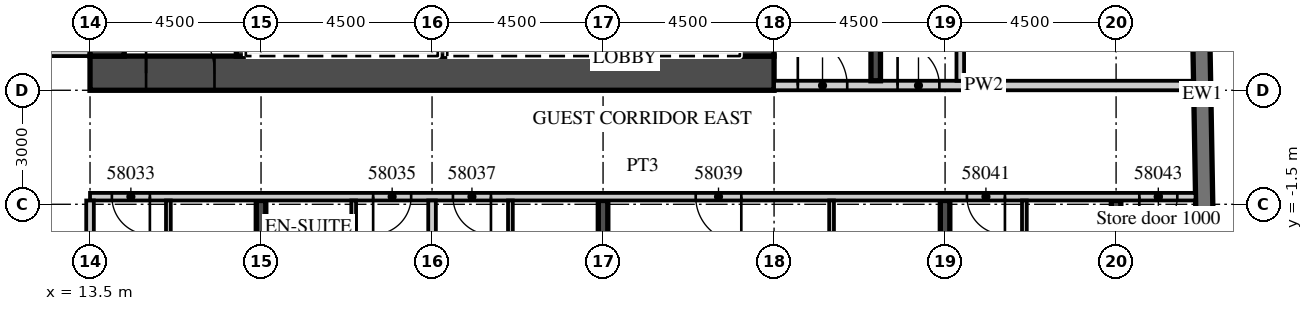
"""IFC4 building model, lengths in metres.
Left out: names, types, materials, properties, quantities, classifications, styles, units other than length and angle.
Written with IfcOpenShell. Run it as: python <this file> out.ifc"""

import sys

from ifc_helpers import new_model, si_unit, direction, frame, frame_2d, origin, place, context, subcontext, project, spatial, rectangle, extrude, element, fill, save


model = new_model("IFC4")
c1 = context("Model", 3, precision=1e-05, world=origin(), true_north=direction((0.0, 1.0)))
c2 = subcontext(c1, "Body", "Model", "MODEL_VIEW")
j1 = project(units=[si_unit("LENGTHUNIT", "METRE"), si_unit("PLANEANGLEUNIT", "RADIAN")], contexts=[c1])
p1 = place(None, origin())
s1 = spatial("IfcSite", under=j1, at=p1, CompositionType="ELEMENT")
p2 = place(p1, origin())
s2 = spatial("IfcBuilding", under=s1, at=p2, CompositionType="ELEMENT")
p3 = place(p2, frame((0.0, 0.0, 237.5)))
s3 = spatial("IfcBuildingStorey", under=s2, at=p3, CompositionType="ELEMENT", Elevation=237.5)
p4 = place(p3, frame((18.0, -19.079, 0.0), z_axis=(0.0, 0.0, 1.0), x_axis=(0.0, 1.0, 0.0)))
e1 = element("IfcWall", 1, at=p4, inside=s3, PredefinedType="SHEAR", context=c2, shape_type="SweptSolid", body=[
    extrude(rectangle(XDim=17.679, YDim=0.25, at=frame_2d((8.84, 0.0))), origin(), (0.0, 0.0, 1.0), 3.3),
])
p5 = place(p3, frame((27.0, -18.922, 0.0), z_axis=(0.0, 0.0, 1.0), x_axis=(0.0, 1.0, 0.0)))
e2 = element("IfcWall", 2, at=p5, inside=s3, PredefinedType="SHEAR", context=c2, shape_type="SweptSolid", body=[
    extrude(rectangle(XDim=17.522, YDim=0.25, at=frame_2d((8.761, 0.0))), origin(), (0.0, 0.0, 1.0), 3.3),
])
p6 = place(p3, frame((36.0, -18.765, 0.0), z_axis=(0.0, 0.0, 1.0), x_axis=(0.0, 1.0, 0.0)))
e3 = element("IfcWall", 3, at=p6, inside=s3, PredefinedType="SHEAR", context=c2, shape_type="SweptSolid", body=[
    extrude(rectangle(XDim=17.365, YDim=0.25, at=frame_2d((8.683, 0.0))), origin(), (0.0, 0.0, 1.0), 3.3),
])
p7 = place(p3, frame((40.5, -18.325, 0.0), z_axis=(0.0, 0.0, 1.0), x_axis=(0.0, 1.0, 0.0)))
e4 = element("IfcWall", 4, at=p7, inside=s3, PredefinedType="SHEAR", context=c2, shape_type="SweptSolid", body=[
    extrude(rectangle(XDim=16.925, YDim=0.25, at=frame_2d((8.463, 0.0))), origin(), (0.0, 0.0, 1.0), 3.3),
])
p8 = place(p3, frame((43.057, -15.103, 0.0), z_axis=(0.0, 0.0, 1.0), x_axis=(-0.017452408953, 0.999847695112, 0.0)))
e5 = element("IfcWall", 5, at=p8, inside=s3, PredefinedType="SOLIDWALL", context=c2, shape_type="SweptSolid", body=[
    extrude(rectangle(XDim=33.0, YDim=0.45, at=frame_2d((16.5, 0.0))), origin(), (0.0, 0.0, 1.0), 3.02),
])
p9 = place(p3, frame((-13.5, 2.5, 0.0), z_axis=(0.0, 0.0, 1.0), x_axis=(1.0, 0.0, 0.0)))
e6 = element("IfcWall", 6, at=p9, inside=s3, PredefinedType="PARTITIONING", context=c2, shape_type="SweptSolid", body=[
    extrude(rectangle(XDim=27.0, YDim=0.2, at=frame_2d((13.5, 0.0))), origin(), (0.0, 0.0, 1.0), 3.02),
])
p10 = place(p9, frame((2.925, 0.0, 0.0)))
e7 = element("IfcOpeningElement", 7, at=p10, cuts=e6, PredefinedType="OPENING", context=c2, shape_type="SweptSolid", body=[
    extrude(rectangle(XDim=1.0, YDim=2.1, at=frame_2d((0.5, 1.05))), frame((0.0, 0.11, 0.0), z_axis=(0.0, -1.0, 0.0), x_axis=(1.0, 0.0, 0.0)), (0.0, 0.0, 1.0), 0.22),
])
p11 = place(p9, frame((7.45, 0.0, 0.0)))
e8 = element("IfcOpeningElement", 8, at=p11, cuts=e6, PredefinedType="OPENING", context=c2, shape_type="SweptSolid", body=[
    extrude(rectangle(XDim=1.0, YDim=2.1, at=frame_2d((0.5, 1.05))), frame((0.0, 0.11, 0.0), z_axis=(0.0, -1.0, 0.0), x_axis=(1.0, 0.0, 0.0)), (0.0, 0.0, 1.0), 0.22),
])
p12 = place(p9, frame((11.925, 0.0, 0.0)))
e9 = element("IfcOpeningElement", 9, at=p12, cuts=e6, PredefinedType="OPENING", context=c2, shape_type="SweptSolid", body=[
    extrude(rectangle(XDim=1.0, YDim=2.1, at=frame_2d((0.5, 1.05))), frame((0.0, 0.11, 0.0), z_axis=(0.0, -1.0, 0.0), x_axis=(1.0, 0.0, 0.0)), (0.0, 0.0, 1.0), 0.22),
])
p13 = place(p9, frame((16.45, 0.0, 0.0)))
e10 = element("IfcOpeningElement", 10, at=p13, cuts=e6, PredefinedType="OPENING", context=c2, shape_type="SweptSolid", body=[
    extrude(rectangle(XDim=1.0, YDim=2.1, at=frame_2d((0.5, 1.05))), frame((0.0, 0.11, 0.0), z_axis=(0.0, -1.0, 0.0), x_axis=(1.0, 0.0, 0.0)), (0.0, 0.0, 1.0), 0.22),
])
p14 = place(p9, frame((18.55, 0.0, 0.0)))
e11 = element("IfcOpeningElement", 11, at=p14, cuts=e6, PredefinedType="OPENING", context=c2, shape_type="SweptSolid", body=[
    extrude(rectangle(XDim=1.0, YDim=2.1, at=frame_2d((0.5, 1.05))), frame((0.0, 0.11, 0.0), z_axis=(0.0, -1.0, 0.0), x_axis=(1.0, 0.0, 0.0)), (0.0, 0.0, 1.0), 0.22),
])
p15 = place(p9, frame((23.075, 0.0, 0.0)))
e12 = element("IfcOpeningElement", 12, at=p15, cuts=e6, PredefinedType="OPENING", context=c2, shape_type="SweptSolid", body=[
    extrude(rectangle(XDim=1.0, YDim=2.1, at=frame_2d((0.5, 1.05))), frame((0.0, 0.11, 0.0), z_axis=(0.0, -1.0, 0.0), x_axis=(1.0, 0.0, 0.0)), (0.0, 0.0, 1.0), 0.22),
])
p16 = place(p3, frame((13.5, -1.3, 0.0), z_axis=(0.0, 0.0, 1.0), x_axis=(1.0, 0.0, 0.0)))
e13 = element("IfcWall", 13, at=p16, inside=s3, PredefinedType="PARTITIONING", context=c2, shape_type="SweptSolid", body=[
    extrude(rectangle(XDim=29.091, YDim=0.2, at=frame_2d((14.545, 0.0))), origin(), (0.0, 0.0, 1.0), 3.02),
])
p17 = place(p16, frame((0.575, 0.0, 0.0)))
e14 = element("IfcOpeningElement", 14, at=p17, cuts=e13, PredefinedType="OPENING", context=c2, shape_type="SweptSolid", body=[
    extrude(rectangle(XDim=1.0, YDim=2.1, at=frame_2d((0.5, 1.05))), frame((0.0, 0.11, 0.0), z_axis=(0.0, -1.0, 0.0), x_axis=(1.0, 0.0, 0.0)), (0.0, 0.0, 1.0), 0.22),
])
p18 = place(p16, frame((7.45, 0.0, 0.0)))
e15 = element("IfcOpeningElement", 15, at=p18, cuts=e13, PredefinedType="OPENING", context=c2, shape_type="SweptSolid", body=[
    extrude(rectangle(XDim=1.0, YDim=2.1, at=frame_2d((0.5, 1.05))), frame((0.0, 0.11, 0.0), z_axis=(0.0, -1.0, 0.0), x_axis=(1.0, 0.0, 0.0)), (0.0, 0.0, 1.0), 0.22),
])
p19 = place(p16, frame((9.55, 0.0, 0.0)))
e16 = element("IfcOpeningElement", 16, at=p19, cuts=e13, PredefinedType="OPENING", context=c2, shape_type="SweptSolid", body=[
    extrude(rectangle(XDim=1.0, YDim=2.1, at=frame_2d((0.5, 1.05))), frame((0.0, 0.11, 0.0), z_axis=(0.0, -1.0, 0.0), x_axis=(1.0, 0.0, 0.0)), (0.0, 0.0, 1.0), 0.22),
])
p20 = place(p16, frame((15.938, 0.0, 0.0)))
e17 = element("IfcOpeningElement", 17, at=p20, cuts=e13, PredefinedType="OPENING", context=c2, shape_type="SweptSolid", body=[
    extrude(rectangle(XDim=1.2, YDim=2.1, at=frame_2d((0.6, 1.05))), frame((0.0, 0.11, 0.0), z_axis=(0.0, -1.0, 0.0), x_axis=(1.0, 0.0, 0.0)), (0.0, 0.0, 1.0), 0.22),
])
p21 = place(p16, frame((23.075, 0.0, 0.0)))
e18 = element("IfcOpeningElement", 18, at=p21, cuts=e13, PredefinedType="OPENING", context=c2, shape_type="SweptSolid", body=[
    extrude(rectangle(XDim=1.0, YDim=2.1, at=frame_2d((0.5, 1.05))), frame((0.0, 0.11, 0.0), z_axis=(0.0, -1.0, 0.0), x_axis=(1.0, 0.0, 0.0)), (0.0, 0.0, 1.0), 0.22),
])
p22 = place(p16, frame((27.611, 0.0, 0.0)))
e19 = element("IfcOpeningElement", 19, at=p22, cuts=e13, PredefinedType="OPENING", context=c2, shape_type="SweptSolid", body=[
    extrude(rectangle(XDim=1.0, YDim=2.4, at=frame_2d((0.5, 1.2))), frame((0.0, 0.11, 0.0), z_axis=(0.0, -1.0, 0.0), x_axis=(1.0, 0.0, 0.0)), (0.0, 0.0, 1.0), 0.22),
])
p23 = place(p3, frame((13.5, -19.17, 0.0), z_axis=(0.0, 0.0, 1.0), x_axis=(0.0, 1.0, 0.0)))
e20 = element("IfcWall", 20, at=p23, inside=s3, PredefinedType="PARTITIONING", context=c2, shape_type="SweptSolid", body=[
    extrude(rectangle(XDim=17.77, YDim=0.2, at=frame_2d((8.885, 0.0))), origin(), (0.0, 0.0, 1.0), 3.02),
])
p24 = place(p3, frame((15.562, -5.125, 0.0), z_axis=(0.0, 0.0, 1.0), x_axis=(0.0, 1.0, 0.0)))
e21 = element("IfcWall", 21, at=p24, inside=s3, PredefinedType="PARTITIONING", context=c2, shape_type="SweptSolid", body=[
    extrude(rectangle(XDim=3.725, YDim=0.125, at=frame_2d((1.863, 0.0))), origin(), (0.0, 0.0, 1.0), 3.02),
])
p25 = place(p24, frame((0.375, 0.0, 0.0)))
e22 = element("IfcOpeningElement", 22, at=p25, cuts=e21, PredefinedType="OPENING", context=c2, shape_type="SweptSolid", body=[
    extrude(rectangle(XDim=0.9, YDim=2.1, at=frame_2d((0.45, 1.05))), frame((0.0, 0.073, 0.0), z_axis=(0.0, -1.0, 0.0), x_axis=(1.0, 0.0, 0.0)), (0.0, 0.0, 1.0), 0.145),
])
p26 = place(p3, frame((22.5, -19.013, 0.0), z_axis=(0.0, 0.0, 1.0), x_axis=(0.0, 1.0, 0.0)))
e23 = element("IfcWall", 23, at=p26, inside=s3, PredefinedType="PARTITIONING", context=c2, shape_type="SweptSolid", body=[
    extrude(rectangle(XDim=17.613, YDim=0.2, at=frame_2d((8.807, 0.0))), origin(), (0.0, 0.0, 1.0), 3.02),
])
p27 = place(p3, frame((20.438, -5.125, 0.0), z_axis=(0.0, 0.0, 1.0), x_axis=(0.0, 1.0, 0.0)))
e24 = element("IfcWall", 24, at=p27, inside=s3, PredefinedType="PARTITIONING", context=c2, shape_type="SweptSolid", body=[
    extrude(rectangle(XDim=3.725, YDim=0.125, at=frame_2d((1.863, 0.0))), origin(), (0.0, 0.0, 1.0), 3.02),
])
p28 = place(p27, frame((0.375, 0.0, 0.0)))
e25 = element("IfcOpeningElement", 25, at=p28, cuts=e24, PredefinedType="OPENING", context=c2, shape_type="SweptSolid", body=[
    extrude(rectangle(XDim=0.9, YDim=2.1, at=frame_2d((0.45, 1.05))), frame((0.0, 0.073, 0.0), z_axis=(0.0, -1.0, 0.0), x_axis=(1.0, 0.0, 0.0)), (0.0, 0.0, 1.0), 0.145),
])
p29 = place(p3, frame((24.562, -5.125, 0.0), z_axis=(0.0, 0.0, 1.0), x_axis=(0.0, 1.0, 0.0)))
e26 = element("IfcWall", 26, at=p29, inside=s3, PredefinedType="PARTITIONING", context=c2, shape_type="SweptSolid", body=[
    extrude(rectangle(XDim=3.725, YDim=0.125, at=frame_2d((1.863, 0.0))), origin(), (0.0, 0.0, 1.0), 3.02),
])
p30 = place(p29, frame((0.375, 0.0, 0.0)))
e27 = element("IfcOpeningElement", 27, at=p30, cuts=e26, PredefinedType="OPENING", context=c2, shape_type="SweptSolid", body=[
    extrude(rectangle(XDim=0.9, YDim=2.1, at=frame_2d((0.45, 1.05))), frame((0.0, 0.073, 0.0), z_axis=(0.0, -1.0, 0.0), x_axis=(1.0, 0.0, 0.0)), (0.0, 0.0, 1.0), 0.145),
])
p31 = place(p3, frame((33.013, -5.125, 0.0), z_axis=(0.0, 0.0, 1.0), x_axis=(0.0, 1.0, 0.0)))
e28 = element("IfcWall", 28, at=p31, inside=s3, PredefinedType="PARTITIONING", context=c2, shape_type="SweptSolid", body=[
    extrude(rectangle(XDim=3.725, YDim=0.125, at=frame_2d((1.863, 0.0))), origin(), (0.0, 0.0, 1.0), 3.02),
])
p32 = place(p31, frame((0.375, 0.0, 0.0)))
e29 = element("IfcOpeningElement", 29, at=p32, cuts=e28, PredefinedType="OPENING", context=c2, shape_type="SweptSolid", body=[
    extrude(rectangle(XDim=0.9, YDim=2.1, at=frame_2d((0.45, 1.05))), frame((0.0, 0.073, 0.0), z_axis=(0.0, -1.0, 0.0), x_axis=(1.0, 0.0, 0.0)), (0.0, 0.0, 1.0), 0.145),
])
p33 = place(p3, frame((38.087, -5.125, 0.0), z_axis=(0.0, 0.0, 1.0), x_axis=(0.0, 1.0, 0.0)))
e30 = element("IfcWall", 30, at=p33, inside=s3, PredefinedType="PARTITIONING", context=c2, shape_type="SweptSolid", body=[
    extrude(rectangle(XDim=3.725, YDim=0.125, at=frame_2d((1.863, 0.0))), origin(), (0.0, 0.0, 1.0), 3.02),
])
p34 = place(p33, frame((0.375, 0.0, 0.0)))
e31 = element("IfcOpeningElement", 31, at=p34, cuts=e30, PredefinedType="OPENING", context=c2, shape_type="SweptSolid", body=[
    extrude(rectangle(XDim=0.9, YDim=2.1, at=frame_2d((0.45, 1.05))), frame((0.0, 0.073, 0.0), z_axis=(0.0, -1.0, 0.0), x_axis=(1.0, 0.0, 0.0)), (0.0, 0.0, 1.0), 0.145),
])
p35 = place(p3, frame((13.5, 1.95, 0.0), z_axis=(0.0, 0.0, 1.0), x_axis=(1.0, 0.0, 0.0)))
e32 = element("IfcWall", 32, at=p35, inside=s3, PredefinedType="SHEAR", context=c2, shape_type="SweptSolid", body=[
    extrude(rectangle(XDim=18.0, YDim=0.9, at=frame_2d((9.0, 0.0))), origin(), (0.0, 0.0, 1.0), 3.02),
])
p36 = place(p35, frame((1.475, 0.0, 0.0)))
e33 = element("IfcOpeningElement", 33, at=p36, cuts=e32, PredefinedType="OPENING", context=c2, shape_type="SweptSolid", body=[
    extrude(rectangle(XDim=1.8, YDim=2.1, at=frame_2d((0.9, 1.05))), frame((0.0, 0.46, 0.0), z_axis=(0.0, -1.0, 0.0), x_axis=(1.0, 0.0, 0.0)), (0.0, 0.0, 1.0), 0.92),
])
p37 = place(p3, frame((31.05, 2.4, 0.0), z_axis=(0.0, 0.0, 1.0), x_axis=(0.0, 1.0, 0.0)))
e34 = element("IfcWall", 34, at=p37, inside=s3, PredefinedType="SHEAR", context=c2, shape_type="SweptSolid", body=[
    extrude(rectangle(XDim=12.8, YDim=0.9, at=frame_2d((6.4, 0.0))), origin(), (0.0, 0.0, 1.0), 3.02),
])
p38 = place(p37, frame((0.2, 0.0, 0.0)))
e35 = element("IfcOpeningElement", 35, at=p38, cuts=e34, PredefinedType="OPENING", context=c2, shape_type="SweptSolid", body=[
    extrude(rectangle(XDim=1.1, YDim=2.1, at=frame_2d((0.55, 1.05))), frame((0.0, 0.46, 0.0), z_axis=(0.0, -1.0, 0.0), x_axis=(1.0, 0.0, 0.0)), (0.0, 0.0, 1.0), 0.92),
])
p39 = place(p3, frame((13.95, 2.4, 0.0), z_axis=(0.0, 0.0, 1.0), x_axis=(0.0, 1.0, 0.0)))
e36 = element("IfcWall", 36, at=p39, inside=s3, PredefinedType="SHEAR", context=c2, shape_type="SweptSolid", body=[
    extrude(rectangle(XDim=12.2, YDim=0.9, at=frame_2d((6.1, 0.0))), origin(), (0.0, 0.0, 1.0), 3.02),
])
p40 = place(p3, frame((17.475, 2.4, 0.0), z_axis=(0.0, 0.0, 1.0), x_axis=(0.0, 1.0, 0.0)))
e37 = element("IfcWall", 37, at=p40, inside=s3, PredefinedType="SHEAR", context=c2, shape_type="SweptSolid", body=[
    extrude(rectangle(XDim=3.15, YDim=0.25, at=frame_2d((1.575, 0.0))), origin(), (0.0, 0.0, 1.0), 3.02),
])
for number, where, z_axis, x_axis in (
    (38, (27.975, 2.4, 0.0), (0.0, 0.0, 1.0), (0.0, 1.0, 0.0)),
    (39, (22.775, 2.4, 0.0), (0.0, 0.0, 1.0), (0.0, 1.0, 0.0)),
):
    element("IfcWall", number, at=place(p3, frame(where, z_axis=z_axis, x_axis=x_axis)), inside=s3, PredefinedType="SHEAR", context=c2, shape_type="SweptSolid", body=[
        extrude(rectangle(XDim=2.9, YDim=0.25, at=frame_2d((1.45, 0.0))), origin(), (0.0, 0.0, 1.0), 3.02),
    ])
p41 = place(p3, frame((31.5, 1.625, 0.0), z_axis=(0.0, 0.0, 1.0), x_axis=(1.0, 0.0, 0.0)))
e40 = element("IfcWall", 40, at=p41, inside=s3, PredefinedType="PARTITIONING", context=c2, shape_type="SweptSolid", body=[
    extrude(rectangle(XDim=11.04, YDim=0.25, at=frame_2d((5.52, 0.0))), origin(), (0.0, 0.0, 1.0), 3.02),
])
p42 = place(p41, frame((0.625, 0.0, 0.0)))
e41 = element("IfcOpeningElement", 41, at=p42, cuts=e40, PredefinedType="OPENING", context=c2, shape_type="SweptSolid", body=[
    extrude(rectangle(XDim=1.3, YDim=2.1, at=frame_2d((0.65, 1.05))), frame((0.0, 0.135, 0.0), z_axis=(0.0, -1.0, 0.0), x_axis=(1.0, 0.0, 0.0)), (0.0, 0.0, 1.0), 0.27),
])
p43 = place(p41, frame((3.25, 0.0, 0.0)))
e42 = element("IfcOpeningElement", 42, at=p43, cuts=e40, PredefinedType="OPENING", context=c2, shape_type="SweptSolid", body=[
    extrude(rectangle(XDim=1.1, YDim=2.1, at=frame_2d((0.55, 1.05))), frame((0.0, 0.135, 0.0), z_axis=(0.0, -1.0, 0.0), x_axis=(1.0, 0.0, 0.0)), (0.0, 0.0, 1.0), 0.27),
])
p44 = place(p3, frame((34.175, 1.75, 0.0), z_axis=(0.0, 0.0, 1.0), x_axis=(0.0, 1.0, 0.0)))
e43 = element("IfcWall", 43, at=p44, inside=s3, PredefinedType="SHEAR", context=c2, shape_type="SweptSolid", body=[
    extrude(rectangle(XDim=8.35, YDim=0.25, at=frame_2d((4.175, 0.0))), origin(), (0.0, 0.0, 1.0), 3.02),
])
p45 = place(p3, frame((36.4, 1.75, 0.0), z_axis=(0.0, 0.0, 1.0), x_axis=(0.0, 1.0, 0.0)))
e44 = element("IfcWall", 44, at=p45, inside=s3, PredefinedType="PARTITIONING", context=c2, shape_type="SweptSolid", body=[
    extrude(rectangle(XDim=15.95, YDim=0.2, at=frame_2d((7.975, 0.0))), origin(), (0.0, 0.0, 1.0), 3.02),
])
p46 = place(p45, frame((14.7, 0.0, 0.0)))
e45 = element("IfcOpeningElement", 45, at=p46, cuts=e44, PredefinedType="OPENING", context=c2, shape_type="SweptSolid", body=[
    extrude(rectangle(XDim=0.9, YDim=2.1, at=frame_2d((0.45, 1.05))), frame((0.0, 0.11, 0.0), z_axis=(0.0, -1.0, 0.0), x_axis=(1.0, 0.0, 0.0)), (0.0, 0.0, 1.0), 0.22),
])
p47 = place(p17, origin())
e46 = element("IfcDoor", 46, at=p47, inside=s3, OperationType="SINGLE_SWING_RIGHT", PredefinedType="DOOR", context=c2, shape_type="SweptSolid", body=[
    extrude(rectangle(XDim=1.0, YDim=2.1, at=frame_2d((0.5, 1.05))), frame((0.0, 0.025, 0.0), z_axis=(0.0, -1.0, 0.0), x_axis=(1.0, 0.0, 0.0)), (0.0, 0.0, 1.0), 0.05),
])
fill(e14, e46)
p48 = place(p18, origin())
e47 = element("IfcDoor", 47, at=p48, inside=s3, OperationType="SINGLE_SWING_LEFT", PredefinedType="DOOR", context=c2, shape_type="SweptSolid", body=[
    extrude(rectangle(XDim=1.0, YDim=2.1, at=frame_2d((0.5, 1.05))), frame((0.0, 0.025, 0.0), z_axis=(0.0, -1.0, 0.0), x_axis=(1.0, 0.0, 0.0)), (0.0, 0.0, 1.0), 0.05),
])
fill(e15, e47)
p49 = place(p19, origin())
e48 = element("IfcDoor", 48, at=p49, inside=s3, OperationType="SINGLE_SWING_RIGHT", PredefinedType="DOOR", context=c2, shape_type="SweptSolid", body=[
    extrude(rectangle(XDim=1.0, YDim=2.1, at=frame_2d((0.5, 1.05))), frame((0.0, 0.025, 0.0), z_axis=(0.0, -1.0, 0.0), x_axis=(1.0, 0.0, 0.0)), (0.0, 0.0, 1.0), 0.05),
])
fill(e16, e48)
p50 = place(p20, origin())
e49 = element("IfcDoor", 49, at=p50, inside=s3, OperationType="SINGLE_SWING_RIGHT", PredefinedType="DOOR", context=c2, shape_type="SweptSolid", body=[
    extrude(rectangle(XDim=1.2, YDim=2.1, at=frame_2d((0.6, 1.05))), frame((0.0, 0.025, 0.0), z_axis=(0.0, -1.0, 0.0), x_axis=(1.0, 0.0, 0.0)), (0.0, 0.0, 1.0), 0.05),
])
fill(e17, e49)
p51 = place(p21, origin())
e50 = element("IfcDoor", 50, at=p51, inside=s3, OperationType="SINGLE_SWING_RIGHT", PredefinedType="DOOR", context=c2, shape_type="SweptSolid", body=[
    extrude(rectangle(XDim=1.0, YDim=2.1, at=frame_2d((0.5, 1.05))), frame((0.0, 0.025, 0.0), z_axis=(0.0, -1.0, 0.0), x_axis=(1.0, 0.0, 0.0)), (0.0, 0.0, 1.0), 0.05),
])
fill(e18, e50)
p52 = place(p22, origin())
e51 = element("IfcDoor", 51, at=p52, inside=s3, OperationType="SINGLE_SWING_LEFT", PredefinedType="DOOR", context=c2, shape_type="SweptSolid", body=[
    extrude(rectangle(XDim=1.0, YDim=2.4, at=frame_2d((0.5, 1.2))), frame((0.0, 0.025, 0.0), z_axis=(0.0, -1.0, 0.0), x_axis=(1.0, 0.0, 0.0)), (0.0, 0.0, 1.0), 0.05),
])
fill(e19, e51)
p53 = place(p36, origin())
e52 = element("IfcDoor", 52, at=p53, inside=s3, OperationType="DOUBLE_DOOR_DOUBLE_SWING", PredefinedType="DOOR", context=c2, shape_type="SweptSolid", body=[
    extrude(rectangle(XDim=1.8, YDim=2.1, at=frame_2d((0.9, 1.05))), frame((0.0, 0.025, 0.0), z_axis=(0.0, -1.0, 0.0), x_axis=(1.0, 0.0, 0.0)), (0.0, 0.0, 1.0), 0.05),
])
fill(e33, e52)
p54 = place(p42, origin())
e53 = element("IfcDoor", 53, at=p54, inside=s3, OperationType="SINGLE_SWING_LEFT", PredefinedType="DOOR", context=c2, shape_type="SweptSolid", body=[
    extrude(rectangle(XDim=1.3, YDim=2.1, at=frame_2d((0.65, 1.05))), frame((0.0, 0.025, 0.0), z_axis=(0.0, -1.0, 0.0), x_axis=(1.0, 0.0, 0.0)), (0.0, 0.0, 1.0), 0.05),
])
fill(e41, e53)
p55 = place(p43, origin())
e54 = element("IfcDoor", 54, at=p55, inside=s3, OperationType="SINGLE_SWING_LEFT", PredefinedType="DOOR", context=c2, shape_type="SweptSolid", body=[
    extrude(rectangle(XDim=1.1, YDim=2.1, at=frame_2d((0.55, 1.05))), frame((0.0, 0.025, 0.0), z_axis=(0.0, -1.0, 0.0), x_axis=(1.0, 0.0, 0.0)), (0.0, 0.0, 1.0), 0.05),
])
fill(e42, e54)
save(model, sys.argv[1])
